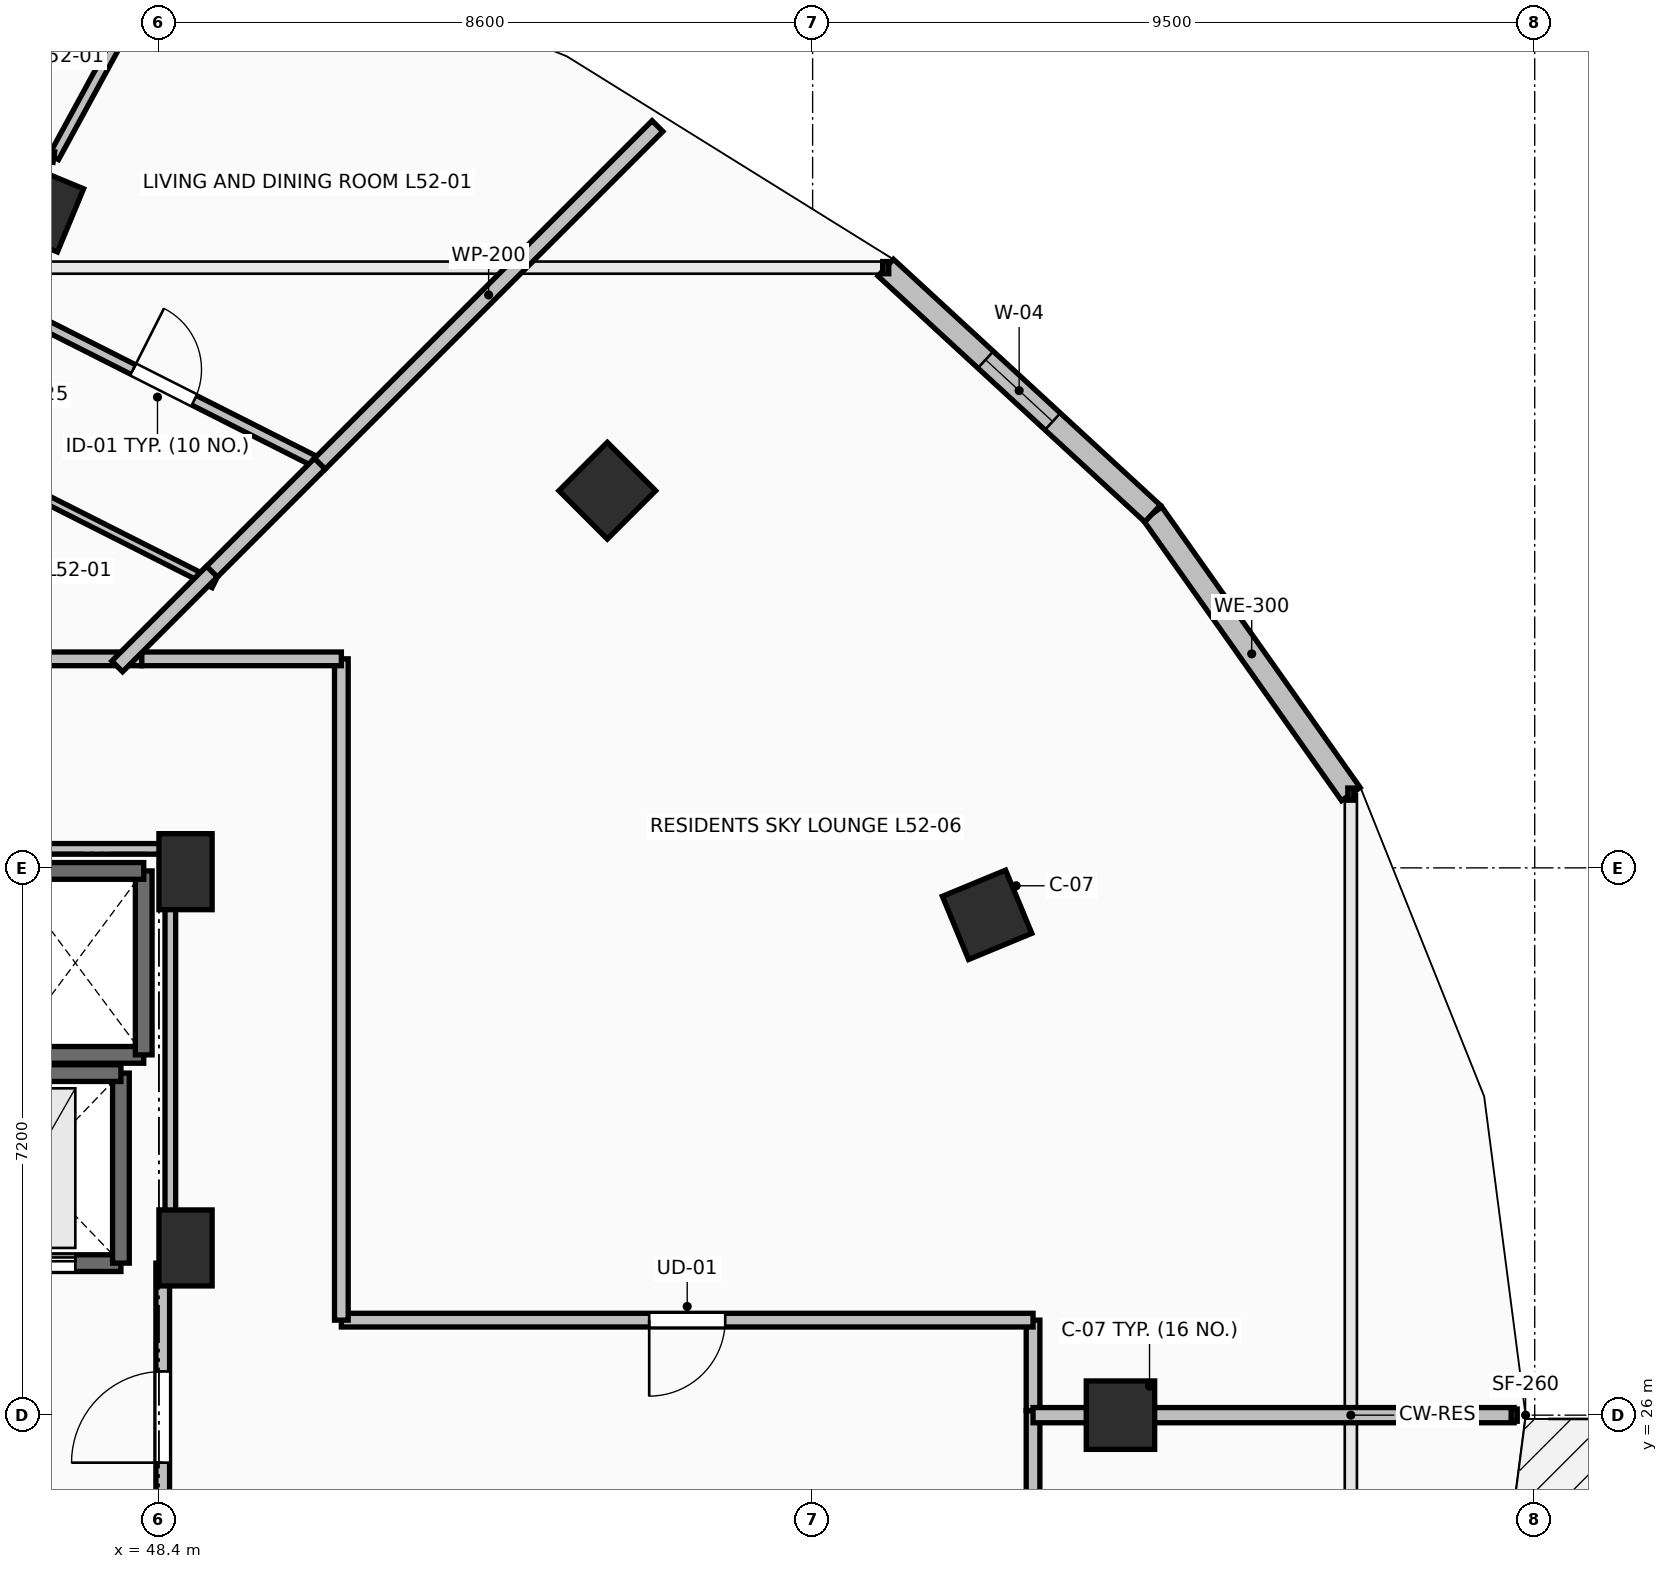
"""IFC4 building model, lengths in metres.
Left out: names, types, materials, properties, quantities, classifications, styles, units other than length and angle.
Written with IfcOpenShell. Run it as: python <this file> out.ifc"""

import sys

from ifc_helpers import new_model, si_unit, direction, frame, frame_2d, origin, origin_2d, place, context, subcontext, project, spatial, rectangle, extrude, element, fill, save


model = new_model("IFC4")
c1 = context("Model", 3, precision=1e-05, world=origin(), true_north=direction((0.0, 1.0)))
c2 = subcontext(c1, "Body", "Model", "MODEL_VIEW")
j1 = project(units=[si_unit("LENGTHUNIT", "METRE"), si_unit("PLANEANGLEUNIT", "RADIAN")], contexts=[c1])
p1 = place(None, origin())
s1 = spatial("IfcSite", under=j1, at=p1, CompositionType="ELEMENT")
p2 = place(p1, origin())
s2 = spatial("IfcBuilding", under=s1, at=p2, CompositionType="ELEMENT")
p3 = place(p2, frame((0.0, 0.0, 193.1)))
s3 = spatial("IfcBuildingStorey", under=s2, at=p3, CompositionType="ELEMENT", Elevation=193.1)
for number, where, z_axis, x_axis in (
    (1, (61.05, 26.0, 0.0), (0.0, 0.0, 1.0), (1.0, 0.0, 0.0)),
    (2, (59.295, 32.582, 0.0), (0.0, 0.0, 1.0), (0.924, 0.383, 0.0)),
    (3, (54.299, 38.162, 0.0), (0.0, 0.0, 1.0), (0.707, 0.707, 0.0)),
    (4, (46.821, 41.891, 0.0), (0.0, 0.0, 1.0), (0.383, 0.924, 0.0)),
):
    element("IfcColumn", number, at=place(p3, frame(where, z_axis=z_axis, x_axis=x_axis)), inside=s3, PredefinedType="COLUMN", context=c2, shape_type="SweptSolid", body=[
        extrude(rectangle(XDim=0.9, YDim=0.9, at=origin_2d()), origin(), (0.0, 0.0, 1.0), 3.5),
    ])
for number, where, z_axis, x_axis in (
    (5, (48.75, 33.15, 0.0), (0.0, 0.0, 1.0), (1.0, 0.0, 0.0)),
    (6, (48.75, 28.2, 0.0), (0.0, 0.0, 1.0), (1.0, 0.0, 0.0)),
):
    element("IfcColumn", number, at=place(p3, frame(where, z_axis=z_axis, x_axis=x_axis)), inside=s3, PredefinedType="PILASTER", context=c2, shape_type="SweptSolid", body=[
        extrude(rectangle(XDim=0.7, YDim=1.0, at=origin_2d()), origin(), (0.0, 0.0, 1.0), 3.5),
    ])
p4 = place(p3, frame((64.081, 34.17, 0.0), z_axis=(0.0, 0.0, 1.0), x_axis=(-0.577168747264, 0.81662490605, 0.0)))
e7 = element("IfcWall", 7, at=p4, inside=s3, PredefinedType="STANDARD", context=c2, shape_type="SweptSolid", body=[
    extrude(rectangle(XDim=4.52, YDim=0.3, at=frame_2d((2.26, 0.0))), origin(), (0.0, 0.0, 1.0), 3.24),
])
p5 = place(p3, frame((61.472, 37.861, 0.0), z_axis=(0.0, 0.0, 1.0), x_axis=(-0.735359993374, 0.677676678177, 0.0)))
e8 = element("IfcWall", 8, at=p5, inside=s3, PredefinedType="STANDARD", context=c2, shape_type="SweptSolid", body=[
    extrude(rectangle(XDim=4.774, YDim=0.3, at=frame_2d((2.387, 0.0))), origin(), (0.0, 0.0, 1.0), 3.24),
])
p6 = place(p5, frame((1.787, 0.0, 0.85)))
e9 = element("IfcOpeningElement", 9, at=p6, cuts=e8, PredefinedType="OPENING", context=c2, shape_type="SweptSolid", body=[
    extrude(rectangle(XDim=1.2, YDim=2.1, at=frame_2d((0.6, 1.05))), frame((0.0, 0.165, 0.0), z_axis=(0.0, -1.0, 0.0), x_axis=(1.0, 0.0, 0.0)), (0.0, 0.0, 1.0), 0.33),
])
p7 = place(p3, frame((46.4, 30.74, 0.0), z_axis=(0.0, 0.0, 1.0), x_axis=(1.0, 0.0, 0.0)))
e10 = element("IfcWall", 10, at=p7, inside=s3, PredefinedType="SOLIDWALL", context=c2, shape_type="SweptSolid", body=[
    extrude(rectangle(XDim=1.8, YDim=0.22, at=frame_2d((0.9, 0.0))), origin(), (0.0, 0.0, 1.0), 3.24),
])
p8 = place(p3, frame((48.2, 30.74, 0.0), z_axis=(0.0, 0.0, 1.0), x_axis=(0.0, 1.0, 0.0)))
e11 = element("IfcWall", 11, at=p8, inside=s3, PredefinedType="SOLIDWALL", context=c2, shape_type="SweptSolid", body=[
    extrude(rectangle(XDim=2.42, YDim=0.22, at=frame_2d((1.21, 0.0))), origin(), (0.0, 0.0, 1.0), 3.24),
])
p9 = place(p3, frame((48.2, 33.16, 0.0), z_axis=(0.0, 0.0, 1.0), x_axis=(-1.0, 0.0, 0.0)))
e12 = element("IfcWall", 12, at=p9, inside=s3, PredefinedType="SOLIDWALL", context=c2, shape_type="SweptSolid", body=[
    extrude(rectangle(XDim=1.8, YDim=0.22, at=frame_2d((0.9, 0.0))), origin(), (0.0, 0.0, 1.0), 3.24),
])
p10 = place(p3, frame((45.5, 28.0, 0.0), z_axis=(0.0, 0.0, 1.0), x_axis=(1.0, 0.0, 0.0)))
e13 = element("IfcWall", 13, at=p10, inside=s3, PredefinedType="SHEAR", context=c2, shape_type="SweptSolid", body=[
    extrude(rectangle(XDim=2.4, YDim=0.22, at=frame_2d((1.2, 0.0))), origin(), (0.0, 0.0, 1.0), 3.24),
])
p11 = place(p10, frame((0.6, 0.0, 0.0)))
e14 = element("IfcOpeningElement", 14, at=p11, cuts=e13, PredefinedType="OPENING", context=c2, shape_type="SweptSolid", body=[
    extrude(rectangle(XDim=1.2, YDim=2.2, at=frame_2d((0.6, 1.1))), frame((0.0, 0.125, 0.0), z_axis=(0.0, -1.0, 0.0), x_axis=(1.0, 0.0, 0.0)), (0.0, 0.0, 1.0), 0.25),
])
p12 = place(p3, frame((47.9, 28.0, 0.0), z_axis=(0.0, 0.0, 1.0), x_axis=(0.0, 1.0, 0.0)))
e15 = element("IfcWall", 15, at=p12, inside=s3, PredefinedType="SHEAR", context=c2, shape_type="SweptSolid", body=[
    extrude(rectangle(XDim=2.5, YDim=0.22, at=frame_2d((1.25, 0.0))), origin(), (0.0, 0.0, 1.0), 3.24),
])
p13 = place(p3, frame((47.9, 30.5, 0.0), z_axis=(0.0, 0.0, 1.0), x_axis=(-1.0, 0.0, 0.0)))
e16 = element("IfcWall", 16, at=p13, inside=s3, PredefinedType="SHEAR", context=c2, shape_type="SweptSolid", body=[
    extrude(rectangle(XDim=2.4, YDim=0.22, at=frame_2d((1.2, 0.0))), origin(), (0.0, 0.0, 1.0), 3.24),
])
p14 = place(p3, frame((48.45, 23.95, 0.0), z_axis=(0.0, 0.0, 1.0), x_axis=(0.0, 1.0, 0.0)))
e17 = element("IfcWall", 17, at=p14, inside=s3, PredefinedType="PARTITIONING", context=c2, shape_type="SweptSolid", body=[
    extrude(rectangle(XDim=4.05, YDim=0.18, at=frame_2d((2.025, 0.0))), origin(), (0.0, 0.0, 1.0), 3.24),
])
p15 = place(p14, frame((1.425, 0.0, 0.0)))
e18 = element("IfcOpeningElement", 18, at=p15, cuts=e17, PredefinedType="OPENING", context=c2, shape_type="SweptSolid", body=[
    extrude(rectangle(XDim=1.2, YDim=2.15, at=frame_2d((0.6, 1.075))), frame((0.0, 0.105, 0.0), z_axis=(0.0, -1.0, 0.0), x_axis=(1.0, 0.0, 0.0)), (0.0, 0.0, 1.0), 0.21),
])
p16 = place(p3, frame((48.175, 35.95, 0.0), z_axis=(0.0, 0.0, 1.0), x_axis=(-1.0, 0.0, 0.0)))
e19 = element("IfcWall", 19, at=p16, inside=s3, PredefinedType="PARTITIONING", context=c2, shape_type="SweptSolid", body=[
    extrude(rectangle(XDim=4.512, YDim=0.18, at=frame_2d((2.256, 0.0))), origin(), (0.0, 0.0, 1.0), 2.432),
])
p17 = place(p3, frame((59.9, 24.55, 0.0), z_axis=(0.0, 0.0, 1.0), x_axis=(0.0, 1.0, 0.0)))
e20 = element("IfcWall", 20, at=p17, inside=s3, PredefinedType="PARTITIONING", context=c2, shape_type="SweptSolid", body=[
    extrude(rectangle(XDim=1.51, YDim=0.18, at=frame_2d((0.755, 0.0))), origin(), (0.0, 0.0, 1.0), 2.432),
])
p18 = place(p3, frame((59.9, 26.06, 0.0), z_axis=(0.0, 0.0, 1.0), x_axis=(0.0, 1.0, 0.0)))
e21 = element("IfcWall", 21, at=p18, inside=s3, PredefinedType="PARTITIONING", context=c2, shape_type="SweptSolid", body=[
    extrude(rectangle(XDim=1.19, YDim=0.18, at=frame_2d((0.595, 0.0))), origin(), (0.0, 0.0, 1.0), 2.432),
])
p19 = place(p3, frame((59.9, 27.25, 0.0), z_axis=(0.0, 0.0, 1.0), x_axis=(-1.0, 0.0, 0.0)))
e22 = element("IfcWall", 22, at=p19, inside=s3, PredefinedType="PARTITIONING", context=c2, shape_type="SweptSolid", body=[
    extrude(rectangle(XDim=9.1, YDim=0.18, at=frame_2d((4.55, 0.0))), origin(), (0.0, 0.0, 1.0), 2.432),
])
p20 = place(p19, frame((4.05, 0.0, 0.0)))
e23 = element("IfcOpeningElement", 23, at=p20, cuts=e22, PredefinedType="OPENING", context=c2, shape_type="SweptSolid", body=[
    extrude(rectangle(XDim=1.0, YDim=2.15, at=frame_2d((0.5, 1.075))), frame((0.0, 0.105, 0.0), z_axis=(0.0, -1.0, 0.0), x_axis=(1.0, 0.0, 0.0)), (0.0, 0.0, 1.0), 0.21),
])
p21 = place(p3, frame((50.8, 27.25, 0.0), z_axis=(0.0, 0.0, 1.0), x_axis=(0.0, 1.0, 0.0)))
e24 = element("IfcWall", 24, at=p21, inside=s3, PredefinedType="PARTITIONING", context=c2, shape_type="SweptSolid", body=[
    extrude(rectangle(XDim=8.7, YDim=0.18, at=frame_2d((4.35, 0.0))), origin(), (0.0, 0.0, 1.0), 2.432),
])
p22 = place(p3, frame((50.8, 35.95, 0.0), z_axis=(0.0, 0.0, 1.0), x_axis=(-1.0, 0.0, 0.0)))
e25 = element("IfcWall", 25, at=p22, inside=s3, PredefinedType="PARTITIONING", context=c2, shape_type="SweptSolid", body=[
    extrude(rectangle(XDim=2.625, YDim=0.18, at=frame_2d((1.312, 0.0))), origin(), (0.0, 0.0, 1.0), 2.432),
])
p23 = place(p3, frame((46.408, 40.592, 0.0), z_axis=(0.0, 0.0, 1.0), x_axis=(0.89252026196, -0.451007297049, 0.0)))
e26 = element("IfcWall", 26, at=p23, inside=s3, PredefinedType="PARTITIONING", context=c2, shape_type="SweptSolid", body=[
    extrude(rectangle(XDim=4.603, YDim=0.14, at=frame_2d((2.301, 0.0))), origin(), (0.0, 0.0, 1.0), 2.432),
])
p24 = place(p23, frame((1.851, 0.0, 0.0)))
e27 = element("IfcOpeningElement", 27, at=p24, cuts=e26, PredefinedType="OPENING", context=c2, shape_type="SweptSolid", body=[
    extrude(rectangle(XDim=0.9, YDim=2.1, at=frame_2d((0.45, 1.05))), frame((0.0, 0.085, 0.0), z_axis=(0.0, -1.0, 0.0), x_axis=(1.0, 0.0, 0.0)), (0.0, 0.0, 1.0), 0.17),
])
p25 = place(p3, frame((47.896, 44.162, 0.0), z_axis=(0.0, 0.0, 1.0), x_axis=(-0.47839521225, -0.87814464691, 0.0)))
e28 = element("IfcWall", 28, at=p25, inside=s3, PredefinedType="PARTITIONING", context=c2, shape_type="SweptSolid", body=[
    extrude(rectangle(XDim=1.835, YDim=0.14, at=frame_2d((0.917, 0.0))), origin(), (0.0, 0.0, 1.0), 3.24),
])
p26 = place(p3, frame((47.018, 42.551, 0.0), z_axis=(0.0, 0.0, 1.0), x_axis=(-0.98887565722, 0.148744527827, 0.0)))
e29 = element("IfcWall", 29, at=p26, inside=s3, PredefinedType="PARTITIONING", context=c2, shape_type="SweptSolid", body=[
    extrude(rectangle(XDim=5.761, YDim=0.14, at=frame_2d((2.881, 0.0))), origin(), (0.0, 0.0, 1.0), 3.24),
])
p27 = place(p26, frame((2.43, 0.0, 0.0)))
e30 = element("IfcOpeningElement", 30, at=p27, cuts=e29, PredefinedType="OPENING", context=c2, shape_type="SweptSolid", body=[
    extrude(rectangle(XDim=0.9, YDim=2.1, at=frame_2d((0.45, 1.05))), frame((0.0, 0.085, 0.0), z_axis=(0.0, -1.0, 0.0), x_axis=(1.0, 0.0, 0.0)), (0.0, 0.0, 1.0), 0.17),
])
p28 = place(p3, frame((50.516, 38.516, 0.0), z_axis=(0.0, 0.0, 1.0), x_axis=(0.707106781187, 0.707106781187, 0.0)))
e31 = element("IfcWall", 31, at=p28, inside=s3, PredefinedType="PARTITIONING", context=c2, shape_type="SweptSolid", body=[
    extrude(rectangle(XDim=6.283, YDim=0.2, at=frame_2d((3.142, 0.0))), origin(), (0.0, 0.0, 1.0), 2.774),
])
p29 = place(p3, frame((45.264, 38.886, 0.0), z_axis=(0.0, 0.0, 1.0), x_axis=(0.892556527512, -0.450935522216, 0.0)))
e32 = element("IfcWall", 32, at=p29, inside=s3, PredefinedType="PARTITIONING", context=c2, shape_type="SweptSolid", body=[
    extrude(rectangle(XDim=4.325, YDim=0.11, at=frame_2d((2.162, 0.0))), origin(), (0.0, 0.0, 1.0), 2.432),
])
p30 = place(p3, frame((48.999, 36.999, 0.0), z_axis=(0.0, 0.0, 1.0), x_axis=(0.707106781187, 0.707106781187, 0.0)))
e33 = element("IfcWall", 33, at=p30, inside=s3, PredefinedType="PARTITIONING", context=c2, shape_type="SweptSolid", body=[
    extrude(rectangle(XDim=2.146, YDim=0.2, at=frame_2d((1.073, 0.0))), origin(), (0.0, 0.0, 1.0), 2.922),
])
p31 = place(p3, frame((47.851, 35.851, 0.0), z_axis=(0.0, 0.0, 1.0), x_axis=(0.707106781187, 0.707106781187, 0.0)))
e34 = element("IfcWall", 34, at=p31, inside=s3, PredefinedType="PARTITIONING", context=c2, shape_type="SweptSolid", body=[
    extrude(rectangle(XDim=1.763, YDim=0.2, at=frame_2d((0.882, 0.0))), origin(), (0.0, 0.0, 1.0), 2.432),
])
p32 = place(p3, frame((66.229, 26.0, 0.0), z_axis=(0.0, 0.0, 1.0), x_axis=(-1.0, 0.0, 0.0)))
e35 = element("IfcWall", 35, at=p32, inside=s3, PredefinedType="PARTITIONING", context=c2, shape_type="SweptSolid", body=[
    extrude(rectangle(XDim=6.329, YDim=0.2, at=frame_2d((3.165, 0.0))), origin(), (0.0, 0.0, 1.0), 2.432),
])
p33 = place(p3, frame((48.55, 28.196, 0.0), z_axis=(0.0, 0.0, 1.0), x_axis=(0.0, 1.0, 0.0)))
e36 = element("IfcWall", 36, at=p33, inside=s3, PredefinedType="PARTITIONING", context=c2, shape_type="SweptSolid", body=[
    extrude(rectangle(XDim=5.254, YDim=0.14, at=frame_2d((2.627, 0.0))), origin(), (0.0, 0.0, 1.0), 2.432),
])
p34 = place(p3, frame((48.55, 33.45, 0.0), z_axis=(0.0, 0.0, 1.0), x_axis=(-1.0, 0.0, 0.0)))
e37 = element("IfcWall", 37, at=p34, inside=s3, PredefinedType="PARTITIONING", context=c2, shape_type="SweptSolid", body=[
    extrude(rectangle(XDim=4.21, YDim=0.14, at=frame_2d((2.105, 0.0))), origin(), (0.0, 0.0, 1.0), 2.432),
])
p35 = place(p6, origin())
e38 = element("IfcWindow", 38, at=p35, inside=s3, PartitioningType="SINGLE_PANEL", PredefinedType="WINDOW", context=c2, shape_type="SweptSolid", body=[
    extrude(rectangle(XDim=1.2, YDim=2.1, at=frame_2d((0.6, 1.05))), frame((0.0, 0.03, 0.0), z_axis=(0.0, -1.0, 0.0), x_axis=(1.0, 0.0, 0.0)), (0.0, 0.0, 1.0), 0.06),
])
fill(e9, e38)
p36 = place(p11, origin())
e39 = element("IfcDoor", 39, at=p36, inside=s3, OperationType="SLIDING_TO_LEFT", PredefinedType="DOOR", context=c2, shape_type="SweptSolid", body=[
    extrude(rectangle(XDim=1.2, YDim=2.2, at=frame_2d((0.6, 1.1))), frame((0.0, 0.025, 0.0), z_axis=(0.0, -1.0, 0.0), x_axis=(1.0, 0.0, 0.0)), (0.0, 0.0, 1.0), 0.05),
])
fill(e14, e39)
p37 = place(p15, origin())
e40 = element("IfcDoor", 40, at=p37, inside=s3, OperationType="SINGLE_SWING_LEFT", PredefinedType="DOOR", context=c2, shape_type="SweptSolid", body=[
    extrude(rectangle(XDim=1.2, YDim=2.15, at=frame_2d((0.6, 1.075))), frame((0.0, 0.025, 0.0), z_axis=(0.0, -1.0, 0.0), x_axis=(1.0, 0.0, 0.0)), (0.0, 0.0, 1.0), 0.05),
])
fill(e18, e40)
p38 = place(p20, origin())
e41 = element("IfcDoor", 41, at=p38, inside=s3, OperationType="SINGLE_SWING_RIGHT", PredefinedType="DOOR", context=c2, shape_type="SweptSolid", body=[
    extrude(rectangle(XDim=1.0, YDim=2.15, at=frame_2d((0.5, 1.075))), frame((0.0, 0.025, 0.0), z_axis=(0.0, -1.0, 0.0), x_axis=(1.0, 0.0, 0.0)), (0.0, 0.0, 1.0), 0.05),
])
fill(e23, e41)
p39 = place(p24, origin())
e42 = element("IfcDoor", 42, at=p39, inside=s3, OperationType="SINGLE_SWING_LEFT", PredefinedType="DOOR", context=c2, shape_type="SweptSolid", body=[
    extrude(rectangle(XDim=0.9, YDim=2.1, at=frame_2d((0.45, 1.05))), frame((0.0, 0.025, 0.0), z_axis=(0.0, -1.0, 0.0), x_axis=(1.0, 0.0, 0.0)), (0.0, 0.0, 1.0), 0.05),
])
fill(e27, e42)
save(model, sys.argv[1])
